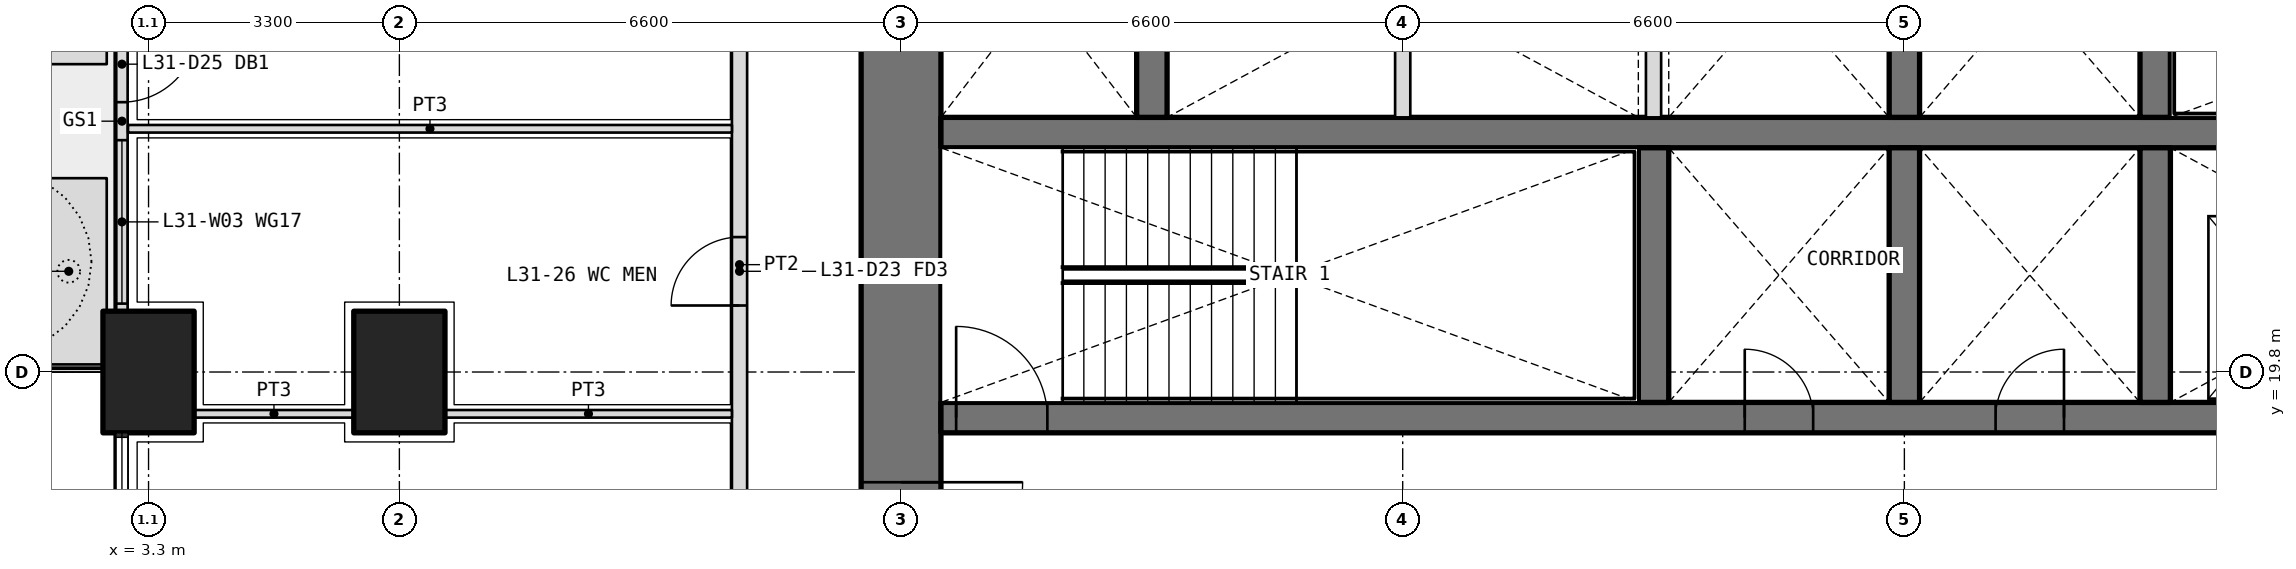
"""IFC4 building model, lengths in metres.
Left out: names, types, materials, properties, quantities, classifications, styles, units other than length and angle.
Written with IfcOpenShell. Run it as: python <this file> out.ifc"""

import sys

from ifc_helpers import new_model, si_unit, direction, frame, frame_2d, origin, origin_2d, place, context, subcontext, project, spatial, polyline, rectangle, outline, extrude, element, fill, save


model = new_model("IFC4")
c1 = context("Model", 3, precision=1e-05, world=origin(), true_north=direction((0.0, 1.0)))
c2 = subcontext(c1, "Body", "Model", "MODEL_VIEW")
j1 = project(units=[si_unit("LENGTHUNIT", "METRE"), si_unit("PLANEANGLEUNIT", "RADIAN")], contexts=[c1])
p1 = place(None, origin())
s1 = spatial("IfcSite", under=j1, at=p1, CompositionType="ELEMENT")
p2 = place(p1, origin())
s2 = spatial("IfcBuilding", under=s1, at=p2, CompositionType="ELEMENT")
p3 = place(p2, frame((0.0, 0.0, 136.8)))
s3 = spatial("IfcBuildingStorey", under=s2, at=p3, CompositionType="ELEMENT", Elevation=136.8)
for number, where, z_axis, x_axis in (
    (1, (3.3, 19.8, 0.0), (0.0, 0.0, 1.0), (0.0, 1.0, 0.0)),
    (2, (6.6, 19.8, 0.0), (0.0, 0.0, 1.0), (0.0, 1.0, 0.0)),
):
    element("IfcColumn", number, at=place(p3, frame(where, z_axis=z_axis, x_axis=x_axis)), inside=s3, PredefinedType="COLUMN", context=c2, shape_type="SweptSolid", body=[
        extrude(rectangle(XDim=1.6, YDim=1.2, at=origin_2d()), origin(), (0.0, 0.0, 1.0), 4.2),
    ])
p4 = place(p3, origin())
e3 = element("IfcWall", 3, at=p4, inside=s3, PredefinedType="USERDEFINED", context=c2, shape_type="SweptSolid", body=[
    extrude(outline(polyline([(1.75, 19.9), (2.75, 19.9), (2.75, 22.35), (1.75, 22.35), (1.75, 19.9)]), holes=[polyline([(1.9, 20.05), (2.6, 20.05), (2.6, 22.2), (1.9, 22.2), (1.9, 20.05)])]), origin(), (0.0, 0.0, 1.0), 1.05),
])
p5 = place(p3, origin())
e4 = element("IfcWall", 4, at=p5, inside=s3, PredefinedType="USERDEFINED", context=c2, shape_type="SweptSolid", body=[
    extrude(outline(polyline([(1.75, 23.85), (2.75, 23.85), (2.75, 32.9), (1.75, 32.9), (1.75, 23.85)]), holes=[polyline([(1.9, 24.0), (2.6, 24.0), (2.6, 32.75), (1.9, 32.75), (1.9, 24.0)])]), origin(), (0.0, 0.0, 1.0), 1.05),
])
p6 = place(p3, frame((2.95, 25.6, 0.0), z_axis=(0.0, 0.0, 1.0), x_axis=(0.0, -1.0, 0.0)))
e5 = element("IfcWall", 5, at=p6, inside=s3, PredefinedType="SOLIDWALL", context=c2, shape_type="SweptSolid", body=[
    extrude(rectangle(XDim=5.0, YDim=0.15, at=frame_2d((2.5, 0.0))), origin(), (0.0, 0.0, 1.0), 2.6),
])
p7 = place(p6, frame((1.25, 0.0, 0.0)))
e6 = element("IfcOpeningElement", 6, at=p7, cuts=e5, PredefinedType="OPENING", context=c2, shape_type="SweptSolid", body=[
    extrude(rectangle(XDim=1.0, YDim=2.4, at=frame_2d((0.5, 1.2))), frame((0.0, 0.085, 0.0), z_axis=(0.0, -1.0, 0.0), x_axis=(1.0, 0.0, 0.0)), (0.0, 0.0, 1.0), 0.17),
])
p8 = place(p6, frame((0.1, 0.0, 0.1)))
e7 = element("IfcOpeningElement", 7, at=p8, cuts=e5, PredefinedType="OPENING", context=c2, shape_type="SweptSolid", body=[
    extrude(rectangle(XDim=1.05, YDim=2.2, at=frame_2d((0.525, 1.1))), frame((0.0, 0.085, 0.0), z_axis=(0.0, -1.0, 0.0), x_axis=(1.0, 0.0, 0.0)), (0.0, 0.0, 1.0), 0.17),
])
p9 = place(p6, frame((2.75, 0.0, 0.1)))
e8 = element("IfcOpeningElement", 8, at=p9, cuts=e5, PredefinedType="OPENING", context=c2, shape_type="SweptSolid", body=[
    extrude(rectangle(XDim=2.15, YDim=2.2, at=frame_2d((1.075, 1.1))), frame((0.0, 0.085, 0.0), z_axis=(0.0, -1.0, 0.0), x_axis=(1.0, 0.0, 0.0)), (0.0, 0.0, 1.0), 0.17),
])
p10 = place(p3, frame((13.2, 32.475, 0.0), z_axis=(0.0, 0.0, 1.0), x_axis=(0.0, -1.0, 0.0)))
e9 = element("IfcWall", 9, at=p10, inside=s3, PredefinedType="SHEAR", context=c2, shape_type="SweptSolid", body=[
    extrude(rectangle(XDim=18.75, YDim=1.05, at=frame_2d((9.375, 0.0))), origin(), (0.0, 0.0, 1.0), 4.2),
])
p11 = place(p10, frame((14.125, 0.0, 0.0)))
e10 = element("IfcOpeningElement", 10, at=p11, cuts=e9, PredefinedType="OPENING", context=c2, shape_type="SweptSolid", body=[
    extrude(rectangle(XDim=1.6, YDim=2.1, at=frame_2d((0.8, 1.05))), frame((0.0, 0.535, 0.0), z_axis=(0.0, -1.0, 0.0), x_axis=(1.0, 0.0, 0.0)), (0.0, 0.0, 1.0), 1.07),
])
p12 = place(p10, frame((3.325, 0.0, 0.0)))
e11 = element("IfcOpeningElement", 11, at=p12, cuts=e9, PredefinedType="OPENING", context=c2, shape_type="SweptSolid", body=[
    extrude(rectangle(XDim=1.6, YDim=2.1, at=frame_2d((0.8, 1.05))), frame((0.0, 0.535, 0.0), z_axis=(0.0, -1.0, 0.0), x_axis=(1.0, 0.0, 0.0)), (0.0, 0.0, 1.0), 1.07),
])
p13 = place(p3, frame((13.725, 19.2, 0.0), z_axis=(0.0, 0.0, 1.0), x_axis=(1.0, 0.0, 0.0)))
e12 = element("IfcWall", 12, at=p13, inside=s3, PredefinedType="SHEAR", context=c2, shape_type="SweptSolid", body=[
    extrude(rectangle(XDim=25.35, YDim=0.4, at=frame_2d((12.675, 0.0))), origin(), (0.0, 0.0, 1.0), 4.2),
])
p14 = place(p13, frame((10.575, 0.0, 0.0)))
e13 = element("IfcOpeningElement", 13, at=p14, cuts=e12, PredefinedType="OPENING", context=c2, shape_type="SweptSolid", body=[
    extrude(rectangle(XDim=0.9, YDim=2.1, at=frame_2d((0.45, 1.05))), frame((0.0, 0.21, 0.0), z_axis=(0.0, -1.0, 0.0), x_axis=(1.0, 0.0, 0.0)), (0.0, 0.0, 1.0), 0.42),
])
p15 = place(p13, frame((13.875, 0.0, 0.0)))
e14 = element("IfcOpeningElement", 14, at=p15, cuts=e12, PredefinedType="OPENING", context=c2, shape_type="SweptSolid", body=[
    extrude(rectangle(XDim=0.9, YDim=2.1, at=frame_2d((0.45, 1.05))), frame((0.0, 0.21, 0.0), z_axis=(0.0, -1.0, 0.0), x_axis=(1.0, 0.0, 0.0)), (0.0, 0.0, 1.0), 0.42),
])
p16 = place(p13, frame((0.2, 0.0, 0.0)))
e15 = element("IfcOpeningElement", 15, at=p16, cuts=e12, PredefinedType="OPENING", context=c2, shape_type="SweptSolid", body=[
    extrude(rectangle(XDim=1.2, YDim=2.1, at=frame_2d((0.6, 1.05))), frame((0.0, 0.21, 0.0), z_axis=(0.0, -1.0, 0.0), x_axis=(1.0, 0.0, 0.0)), (0.0, 0.0, 1.0), 0.42),
])
p17 = place(p13, frame((23.512, 0.0, 0.0)))
e16 = element("IfcOpeningElement", 16, at=p17, cuts=e12, PredefinedType="OPENING", context=c2, shape_type="SweptSolid", body=[
    extrude(rectangle(XDim=1.1, YDim=2.1, at=frame_2d((0.55, 1.05))), frame((0.0, 0.21, 0.0), z_axis=(0.0, -1.0, 0.0), x_axis=(1.0, 0.0, 0.0)), (0.0, 0.0, 1.0), 0.42),
])
p18 = place(p13, frame((17.125, 0.0, 0.0)))
e17 = element("IfcOpeningElement", 17, at=p18, cuts=e12, PredefinedType="OPENING", context=c2, shape_type="SweptSolid", body=[
    extrude(rectangle(XDim=1.1, YDim=2.1, at=frame_2d((0.55, 1.05))), frame((0.0, 0.21, 0.0), z_axis=(0.0, -1.0, 0.0), x_axis=(1.0, 0.0, 0.0)), (0.0, 0.0, 1.0), 0.42),
])
p19 = place(p13, frame((20.325, 0.0, 0.0)))
e18 = element("IfcOpeningElement", 18, at=p19, cuts=e12, PredefinedType="OPENING", context=c2, shape_type="SweptSolid", body=[
    extrude(rectangle(XDim=1.1, YDim=2.1, at=frame_2d((0.55, 1.05))), frame((0.0, 0.21, 0.0), z_axis=(0.0, -1.0, 0.0), x_axis=(1.0, 0.0, 0.0)), (0.0, 0.0, 1.0), 0.42),
])
p20 = place(p3, frame((13.725, 22.95, 0.0), z_axis=(0.0, 0.0, 1.0), x_axis=(1.0, 0.0, 0.0)))
e19 = element("IfcWall", 19, at=p20, inside=s3, PredefinedType="SHEAR", context=c2, shape_type="SweptSolid", body=[
    extrude(rectangle(XDim=25.35, YDim=0.4, at=frame_2d((12.675, 0.0))), origin(), (0.0, 0.0, 1.0), 4.2),
])
for number, where, z_axis, x_axis in (
    (20, (23.1, 19.4, 0.0), (0.0, 0.0, 1.0), (0.0, 1.0, 0.0)),
    (21, (26.4, 19.4, 0.0), (0.0, 0.0, 1.0), (0.0, 1.0, 0.0)),
    (22, (29.7, 19.4, 0.0), (0.0, 0.0, 1.0), (0.0, 1.0, 0.0)),
    (23, (16.5, 23.15, 0.0), (0.0, 0.0, 1.0), (0.0, 1.0, 0.0)),
    (24, (26.4, 23.15, 0.0), (0.0, 0.0, 1.0), (0.0, 1.0, 0.0)),
    (25, (29.7, 23.15, 0.0), (0.0, 0.0, 1.0), (0.0, 1.0, 0.0)),
):
    element("IfcWall", number, at=place(p3, frame(where, z_axis=z_axis, x_axis=x_axis)), inside=s3, PredefinedType="SHEAR", context=c2, shape_type="SweptSolid", body=[
        extrude(rectangle(XDim=3.35, YDim=0.4, at=frame_2d((1.675, 0.0))), origin(), (0.0, 0.0, 1.0), 4.2),
    ])
for number, where, z_axis, x_axis in (
    (26, (19.8, 23.15, 0.0), (0.0, 0.0, 1.0), (0.0, 1.0, 0.0)),
    (27, (23.1, 23.15, 0.0), (0.0, 0.0, 1.0), (0.0, 1.0, 0.0)),
):
    element("IfcWall", number, at=place(p3, frame(where, z_axis=z_axis, x_axis=x_axis)), inside=s3, PredefinedType="PARTITIONING", context=c2, shape_type="SweptSolid", body=[
        extrude(rectangle(XDim=3.35, YDim=0.2, at=frame_2d((1.675, 0.0))), origin(), (0.0, 0.0, 1.0), 4.2),
    ])
p21 = place(p3, frame((11.075, 7.4, 0.0), z_axis=(0.0, 0.0, 1.0), x_axis=(0.0, 1.0, 0.0)))
e28 = element("IfcWall", 28, at=p21, inside=s3, PredefinedType="PARTITIONING", context=c2, shape_type="SweptSolid", body=[
    extrude(rectangle(XDim=27.625, YDim=0.2, at=frame_2d((13.812, 0.0))), origin(), (0.0, 0.0, 1.0), 2.85),
])
p22 = place(p21, frame((2.35, 0.0, 0.0)))
e29 = element("IfcOpeningElement", 29, at=p22, cuts=e28, PredefinedType="OPENING", context=c2, shape_type="SweptSolid", body=[
    extrude(rectangle(XDim=1.0, YDim=2.1, at=frame_2d((0.5, 1.05))), frame((0.0, 0.11, 0.0), z_axis=(0.0, -1.0, 0.0), x_axis=(1.0, 0.0, 0.0)), (0.0, 0.0, 1.0), 0.22),
])
p23 = place(p21, frame((6.35, 0.0, 0.0)))
e30 = element("IfcOpeningElement", 30, at=p23, cuts=e28, PredefinedType="OPENING", context=c2, shape_type="SweptSolid", body=[
    extrude(rectangle(XDim=1.0, YDim=2.1, at=frame_2d((0.5, 1.05))), frame((0.0, 0.11, 0.0), z_axis=(0.0, -1.0, 0.0), x_axis=(1.0, 0.0, 0.0)), (0.0, 0.0, 1.0), 0.22),
])
p24 = place(p21, frame((9.425, 0.0, 0.0)))
e31 = element("IfcOpeningElement", 31, at=p24, cuts=e28, PredefinedType="OPENING", context=c2, shape_type="SweptSolid", body=[
    extrude(rectangle(XDim=0.9, YDim=2.1, at=frame_2d((0.45, 1.05))), frame((0.0, 0.11, 0.0), z_axis=(0.0, -1.0, 0.0), x_axis=(1.0, 0.0, 0.0)), (0.0, 0.0, 1.0), 0.22),
])
p25 = place(p21, frame((13.275, 0.0, 0.0)))
e32 = element("IfcOpeningElement", 32, at=p25, cuts=e28, PredefinedType="OPENING", context=c2, shape_type="SweptSolid", body=[
    extrude(rectangle(XDim=0.9, YDim=2.1, at=frame_2d((0.45, 1.05))), frame((0.0, 0.11, 0.0), z_axis=(0.0, -1.0, 0.0), x_axis=(1.0, 0.0, 0.0)), (0.0, 0.0, 1.0), 0.22),
])
p26 = place(p21, frame((16.8, 0.0, 0.0)))
e33 = element("IfcOpeningElement", 33, at=p26, cuts=e28, PredefinedType="OPENING", context=c2, shape_type="SweptSolid", body=[
    extrude(rectangle(XDim=1.0, YDim=2.1, at=frame_2d((0.5, 1.05))), frame((0.0, 0.11, 0.0), z_axis=(0.0, -1.0, 0.0), x_axis=(1.0, 0.0, 0.0)), (0.0, 0.0, 1.0), 0.22),
])
p27 = place(p21, frame((21.8, 0.0, 0.0)))
e34 = element("IfcOpeningElement", 34, at=p27, cuts=e28, PredefinedType="OPENING", context=c2, shape_type="SweptSolid", body=[
    extrude(rectangle(XDim=1.0, YDim=2.1, at=frame_2d((0.5, 1.05))), frame((0.0, 0.11, 0.0), z_axis=(0.0, -1.0, 0.0), x_axis=(1.0, 0.0, 0.0)), (0.0, 0.0, 1.0), 0.22),
])
p28 = place(p21, frame((26.163, 0.0, 0.0)))
e35 = element("IfcOpeningElement", 35, at=p28, cuts=e28, PredefinedType="OPENING", context=c2, shape_type="SweptSolid", body=[
    extrude(rectangle(XDim=1.0, YDim=2.1, at=frame_2d((0.5, 1.05))), frame((0.0, 0.11, 0.0), z_axis=(0.0, -1.0, 0.0), x_axis=(1.0, 0.0, 0.0)), (0.0, 0.0, 1.0), 0.22),
])
p29 = place(p3, frame((3.9, 19.25, 0.0), z_axis=(0.0, 0.0, 1.0), x_axis=(1.0, 0.0, 0.0)))
e36 = element("IfcWall", 36, at=p29, inside=s3, PredefinedType="PARTITIONING", context=c2, shape_type="SweptSolid", body=[
    extrude(rectangle(XDim=2.1, YDim=0.1, at=frame_2d((1.05, 0.0))), origin(), (0.0, 0.0, 1.0), 2.85),
])
p30 = place(p3, frame((7.2, 19.25, 0.0), z_axis=(0.0, 0.0, 1.0), x_axis=(1.0, 0.0, 0.0)))
e37 = element("IfcWall", 37, at=p30, inside=s3, PredefinedType="PARTITIONING", context=c2, shape_type="SweptSolid", body=[
    extrude(rectangle(XDim=3.775, YDim=0.1, at=frame_2d((1.888, 0.0))), origin(), (0.0, 0.0, 1.0), 2.85),
])
p31 = place(p3, frame((3.03, 23.0, 0.0), z_axis=(0.0, 0.0, 1.0), x_axis=(1.0, 0.0, 0.0)))
e38 = element("IfcWall", 38, at=p31, inside=s3, PredefinedType="PARTITIONING", context=c2, shape_type="SweptSolid", body=[
    extrude(rectangle(XDim=7.945, YDim=0.1, at=frame_2d((3.973, 0.0))), origin(), (0.0, 0.0, 1.0), 2.6),
])
p32 = place(p7, origin())
e39 = element("IfcDoor", 39, at=p32, inside=s3, OperationType="SINGLE_SWING_LEFT", PredefinedType="DOOR", context=c2, shape_type="SweptSolid", body=[
    extrude(rectangle(XDim=1.0, YDim=2.4, at=frame_2d((0.5, 1.2))), frame((0.0, 0.025, 0.0), z_axis=(0.0, -1.0, 0.0), x_axis=(1.0, 0.0, 0.0)), (0.0, 0.0, 1.0), 0.05),
])
fill(e6, e39)
p33 = place(p9, origin())
e40 = element("IfcWindow", 40, at=p33, inside=s3, PartitioningType="SINGLE_PANEL", PredefinedType="WINDOW", context=c2, shape_type="SweptSolid", body=[
    extrude(rectangle(XDim=2.15, YDim=2.2, at=frame_2d((1.075, 1.1))), frame((0.0, 0.03, 0.0), z_axis=(0.0, -1.0, 0.0), x_axis=(1.0, 0.0, 0.0)), (0.0, 0.0, 1.0), 0.06),
])
fill(e8, e40)
p34 = place(p25, origin())
e41 = element("IfcDoor", 41, at=p34, inside=s3, OperationType="SINGLE_SWING_LEFT", PredefinedType="DOOR", context=c2, shape_type="SweptSolid", body=[
    extrude(rectangle(XDim=0.9, YDim=2.1, at=frame_2d((0.45, 1.05))), frame((0.0, 0.025, 0.0), z_axis=(0.0, -1.0, 0.0), x_axis=(1.0, 0.0, 0.0)), (0.0, 0.0, 1.0), 0.05),
])
fill(e32, e41)
p35 = place(p14, origin())
e42 = element("IfcDoor", 42, at=p35, inside=s3, OperationType="SINGLE_SWING_LEFT", PredefinedType="DOOR", context=c2, shape_type="SweptSolid", body=[
    extrude(rectangle(XDim=0.9, YDim=2.1, at=frame_2d((0.45, 1.05))), frame((0.0, 0.025, 0.0), z_axis=(0.0, -1.0, 0.0), x_axis=(1.0, 0.0, 0.0)), (0.0, 0.0, 1.0), 0.05),
])
fill(e13, e42)
p36 = place(p15, origin())
e43 = element("IfcDoor", 43, at=p36, inside=s3, OperationType="SINGLE_SWING_RIGHT", PredefinedType="DOOR", context=c2, shape_type="SweptSolid", body=[
    extrude(rectangle(XDim=0.9, YDim=2.1, at=frame_2d((0.45, 1.05))), frame((0.0, 0.025, 0.0), z_axis=(0.0, -1.0, 0.0), x_axis=(1.0, 0.0, 0.0)), (0.0, 0.0, 1.0), 0.05),
])
fill(e14, e43)
p37 = place(p16, origin())
e44 = element("IfcDoor", 44, at=p37, inside=s3, OperationType="SINGLE_SWING_LEFT", PredefinedType="DOOR", context=c2, shape_type="SweptSolid", body=[
    extrude(rectangle(XDim=1.2, YDim=2.1, at=frame_2d((0.6, 1.05))), frame((0.0, 0.025, 0.0), z_axis=(0.0, -1.0, 0.0), x_axis=(1.0, 0.0, 0.0)), (0.0, 0.0, 1.0), 0.05),
])
fill(e15, e44)
p38 = place(p11, origin())
e45 = element("IfcDoor", 45, at=p38, inside=s3, OperationType="DOUBLE_DOOR_DOUBLE_SWING", PredefinedType="DOOR", context=c2, shape_type="SweptSolid", body=[
    extrude(rectangle(XDim=1.6, YDim=2.1, at=frame_2d((0.8, 1.05))), frame((0.0, 0.025, 0.0), z_axis=(0.0, -1.0, 0.0), x_axis=(1.0, 0.0, 0.0)), (0.0, 0.0, 1.0), 0.05),
])
fill(e10, e45)
save(model, sys.argv[1])
